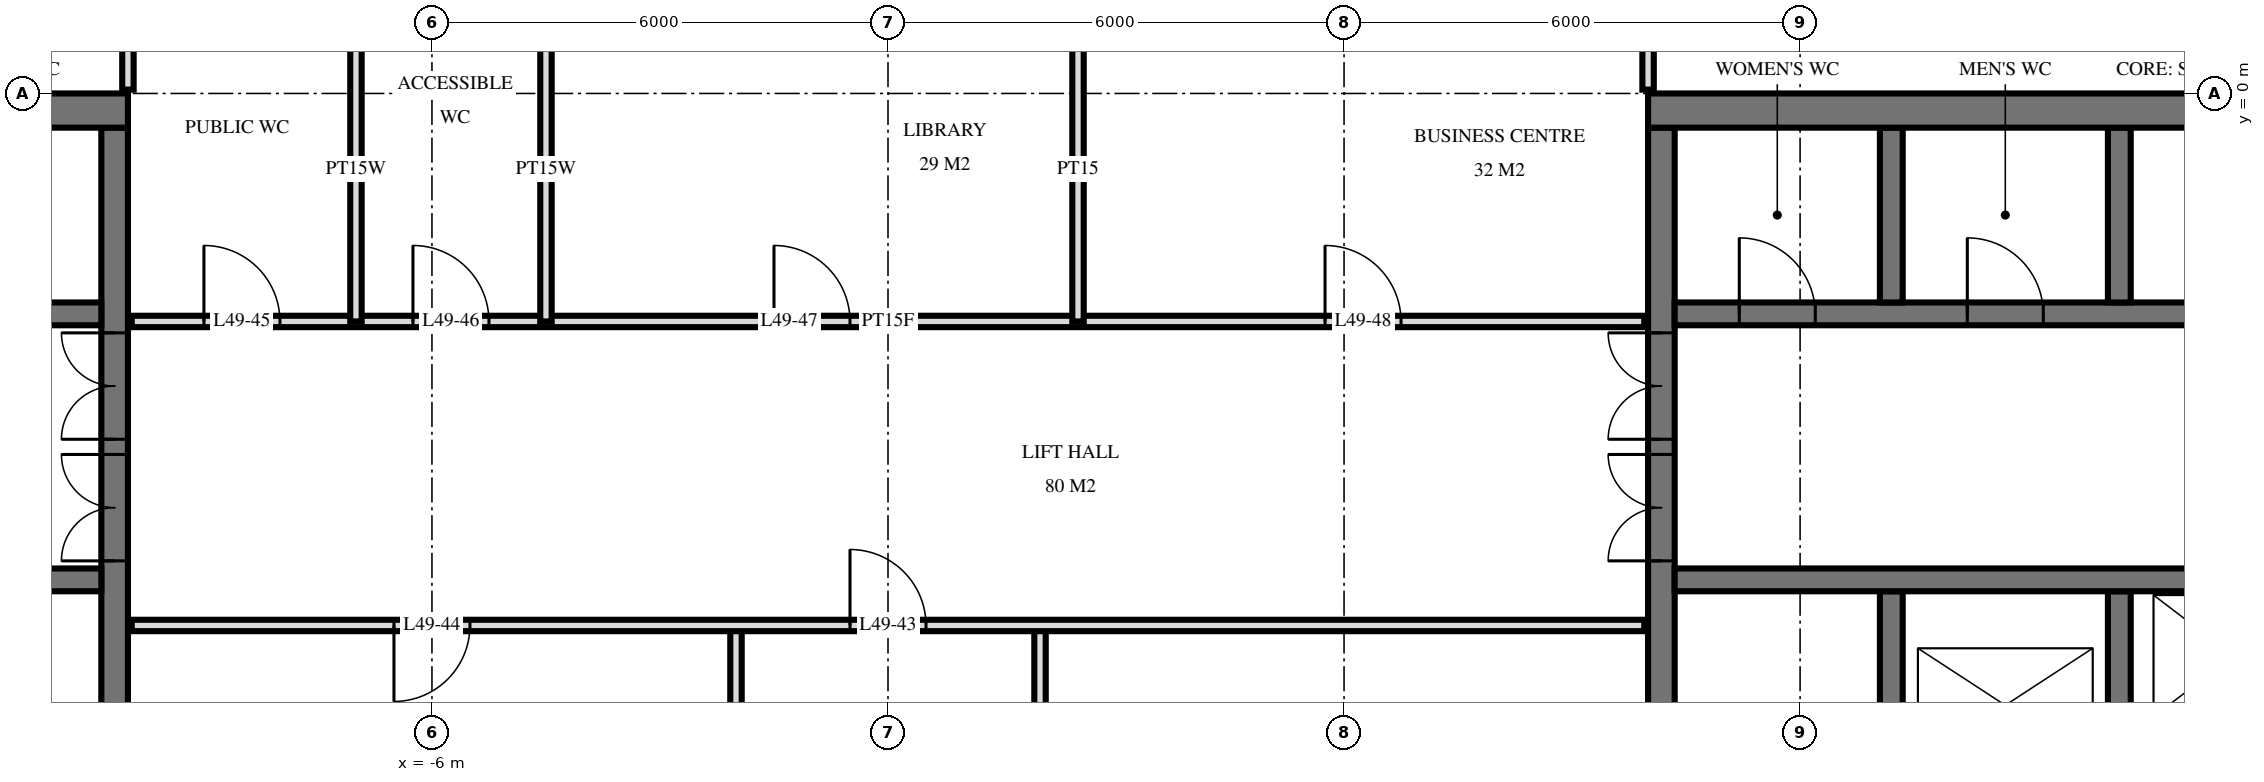
"""IFC4 building model, lengths in metres.
Left out: names, types, materials, properties, quantities, classifications, styles, units other than length and angle.
Written with IfcOpenShell. Run it as: python <this file> out.ifc"""

import sys

from ifc_helpers import new_model, si_unit, direction, frame, frame_2d, origin, place, context, subcontext, project, spatial, rectangle, extrude, element, fill, save


model = new_model("IFC4")
c1 = context("Model", 3, precision=1e-05, world=origin(), true_north=direction((0.0, 1.0)))
c2 = subcontext(c1, "Body", "Model", "MODEL_VIEW")
j1 = project(units=[si_unit("LENGTHUNIT", "METRE"), si_unit("PLANEANGLEUNIT", "RADIAN")], contexts=[c1])
p1 = place(None, origin())
s1 = spatial("IfcSite", under=j1, at=p1, CompositionType="ELEMENT")
p2 = place(p1, origin())
s2 = spatial("IfcBuilding", under=s1, at=p2, CompositionType="ELEMENT")
p3 = place(p2, frame((0.0, 0.0, 190.6)))
s3 = spatial("IfcBuildingStorey", under=s2, at=p3, CompositionType="ELEMENT", Elevation=190.6)
p4 = place(p3, frame((-24.5, -0.225, 0.0), z_axis=(0.0, 0.0, 1.0), x_axis=(1.0, 0.0, 0.0)))
e1 = element("IfcWall", 1, at=p4, inside=s3, PredefinedType="SHEAR", context=c2, shape_type="SweptSolid", body=[
    extrude(rectangle(XDim=14.5, YDim=0.45, at=frame_2d((7.25, 0.0))), origin(), (0.0, 0.0, 1.0), 3.5),
])
p5 = place(p3, frame((-10.175, -14.55, 0.0), z_axis=(0.0, 0.0, 1.0), x_axis=(0.0, 1.0, 0.0)))
e2 = element("IfcWall", 2, at=p5, inside=s3, PredefinedType="SHEAR", context=c2, shape_type="SweptSolid", body=[
    extrude(rectangle(XDim=14.1, YDim=0.35, at=frame_2d((7.05, 0.0))), origin(), (0.0, 0.0, 1.0), 3.5),
])
p6 = place(p5, frame((8.4, 0.0, 0.0)))
e3 = element("IfcOpeningElement", 3, at=p6, cuts=e2, PredefinedType="OPENING", context=c2, shape_type="SweptSolid", body=[
    extrude(rectangle(XDim=1.4, YDim=2.4, at=frame_2d((0.7, 1.2))), frame((0.0, 0.185, 0.0), z_axis=(0.0, -1.0, 0.0), x_axis=(1.0, 0.0, 0.0)), (0.0, 0.0, 1.0), 0.37),
])
p7 = place(p5, frame((10.0, 0.0, 0.0)))
e4 = element("IfcOpeningElement", 4, at=p7, cuts=e2, PredefinedType="OPENING", context=c2, shape_type="SweptSolid", body=[
    extrude(rectangle(XDim=1.4, YDim=2.4, at=frame_2d((0.7, 1.2))), frame((0.0, 0.185, 0.0), z_axis=(0.0, -1.0, 0.0), x_axis=(1.0, 0.0, 0.0)), (0.0, 0.0, 1.0), 0.37),
])
p8 = place(p5, frame((4.0, 0.0, 0.0)))
e5 = element("IfcOpeningElement", 5, at=p8, cuts=e2, PredefinedType="OPENING", context=c2, shape_type="SweptSolid", body=[
    extrude(rectangle(XDim=1.2, YDim=2.1, at=frame_2d((0.6, 1.05))), frame((0.0, 0.185, 0.0), z_axis=(0.0, -1.0, 0.0), x_axis=(1.0, 0.0, 0.0)), (0.0, 0.0, 1.0), 0.37),
])
p9 = place(p3, frame((-24.05, -2.9, 0.0), z_axis=(0.0, 0.0, 1.0), x_axis=(1.0, 0.0, 0.0)))
e6 = element("IfcWall", 6, at=p9, inside=s3, PredefinedType="SHEAR", context=c2, shape_type="SweptSolid", body=[
    extrude(rectangle(XDim=13.7, YDim=0.3, at=frame_2d((6.85, 0.0))), origin(), (0.0, 0.0, 1.0), 3.5),
])
p10 = place(p9, frame((0.55, 0.0, 0.0)))
e7 = element("IfcOpeningElement", 7, at=p10, cuts=e6, PredefinedType="OPENING", context=c2, shape_type="SweptSolid", body=[
    extrude(rectangle(XDim=1.1, YDim=2.1, at=frame_2d((0.55, 1.05))), frame((0.0, 0.16, 0.0), z_axis=(0.0, -1.0, 0.0), x_axis=(1.0, 0.0, 0.0)), (0.0, 0.0, 1.0), 0.32),
])
p11 = place(p9, frame((5.9, 0.0, 0.0)))
e8 = element("IfcOpeningElement", 8, at=p11, cuts=e6, PredefinedType="OPENING", context=c2, shape_type="SweptSolid", body=[
    extrude(rectangle(XDim=0.9, YDim=2.1, at=frame_2d((0.45, 1.05))), frame((0.0, 0.16, 0.0), z_axis=(0.0, -1.0, 0.0), x_axis=(1.0, 0.0, 0.0)), (0.0, 0.0, 1.0), 0.32),
])
p12 = place(p9, frame((11.85, 0.0, 0.0)))
e9 = element("IfcOpeningElement", 9, at=p12, cuts=e6, PredefinedType="OPENING", context=c2, shape_type="SweptSolid", body=[
    extrude(rectangle(XDim=1.0, YDim=2.1, at=frame_2d((0.5, 1.05))), frame((0.0, 0.16, 0.0), z_axis=(0.0, -1.0, 0.0), x_axis=(1.0, 0.0, 0.0)), (0.0, 0.0, 1.0), 0.32),
])
p13 = place(p9, frame((8.85, 0.0, 0.0)))
e10 = element("IfcOpeningElement", 10, at=p13, cuts=e6, PredefinedType="OPENING", context=c2, shape_type="SweptSolid", body=[
    extrude(rectangle(XDim=1.0, YDim=2.1, at=frame_2d((0.5, 1.05))), frame((0.0, 0.16, 0.0), z_axis=(0.0, -1.0, 0.0), x_axis=(1.0, 0.0, 0.0)), (0.0, 0.0, 1.0), 0.32),
])
p14 = place(p9, frame((3.0, 0.0, 0.0)))
e11 = element("IfcOpeningElement", 11, at=p14, cuts=e6, PredefinedType="OPENING", context=c2, shape_type="SweptSolid", body=[
    extrude(rectangle(XDim=1.0, YDim=2.1, at=frame_2d((0.5, 1.05))), frame((0.0, 0.16, 0.0), z_axis=(0.0, -1.0, 0.0), x_axis=(1.0, 0.0, 0.0)), (0.0, 0.0, 1.0), 0.32),
])
p15 = place(p3, frame((-24.05, -6.4, 0.0), z_axis=(0.0, 0.0, 1.0), x_axis=(1.0, 0.0, 0.0)))
e12 = element("IfcWall", 12, at=p15, inside=s3, PredefinedType="SHEAR", context=c2, shape_type="SweptSolid", body=[
    extrude(rectangle(XDim=13.7, YDim=0.3, at=frame_2d((6.85, 0.0))), origin(), (0.0, 0.0, 1.0), 3.5),
])
p16 = place(p15, frame((0.55, 0.0, 0.0)))
e13 = element("IfcOpeningElement", 13, at=p16, cuts=e12, PredefinedType="OPENING", context=c2, shape_type="SweptSolid", body=[
    extrude(rectangle(XDim=1.1, YDim=2.1, at=frame_2d((0.55, 1.05))), frame((0.0, 0.16, 0.0), z_axis=(0.0, -1.0, 0.0), x_axis=(1.0, 0.0, 0.0)), (0.0, 0.0, 1.0), 0.32),
])
p17 = place(p15, frame((5.8, 0.0, 0.0)))
e14 = element("IfcOpeningElement", 14, at=p17, cuts=e12, PredefinedType="OPENING", context=c2, shape_type="SweptSolid", body=[
    extrude(rectangle(XDim=1.1, YDim=2.1, at=frame_2d((0.55, 1.05))), frame((0.0, 0.16, 0.0), z_axis=(0.0, -1.0, 0.0), x_axis=(1.0, 0.0, 0.0)), (0.0, 0.0, 1.0), 0.32),
])
p18 = place(p3, frame((10.0, -0.225, 0.0), z_axis=(0.0, 0.0, 1.0), x_axis=(1.0, 0.0, 0.0)))
e15 = element("IfcWall", 15, at=p18, inside=s3, PredefinedType="SHEAR", context=c2, shape_type="SweptSolid", body=[
    extrude(rectangle(XDim=14.5, YDim=0.45, at=frame_2d((7.25, 0.0))), origin(), (0.0, 0.0, 1.0), 3.5),
])
p19 = place(p3, frame((10.175, -14.55, 0.0), z_axis=(0.0, 0.0, 1.0), x_axis=(0.0, 1.0, 0.0)))
e16 = element("IfcWall", 16, at=p19, inside=s3, PredefinedType="SHEAR", context=c2, shape_type="SweptSolid", body=[
    extrude(rectangle(XDim=14.1, YDim=0.35, at=frame_2d((7.05, 0.0))), origin(), (0.0, 0.0, 1.0), 3.5),
])
p20 = place(p19, frame((8.4, 0.0, 0.0)))
e17 = element("IfcOpeningElement", 17, at=p20, cuts=e16, PredefinedType="OPENING", context=c2, shape_type="SweptSolid", body=[
    extrude(rectangle(XDim=1.4, YDim=2.4, at=frame_2d((0.7, 1.2))), frame((0.0, 0.185, 0.0), z_axis=(0.0, -1.0, 0.0), x_axis=(1.0, 0.0, 0.0)), (0.0, 0.0, 1.0), 0.37),
])
p21 = place(p19, frame((10.0, 0.0, 0.0)))
e18 = element("IfcOpeningElement", 18, at=p21, cuts=e16, PredefinedType="OPENING", context=c2, shape_type="SweptSolid", body=[
    extrude(rectangle(XDim=1.4, YDim=2.4, at=frame_2d((0.7, 1.2))), frame((0.0, 0.185, 0.0), z_axis=(0.0, -1.0, 0.0), x_axis=(1.0, 0.0, 0.0)), (0.0, 0.0, 1.0), 0.37),
])
p22 = place(p19, frame((4.0, 0.0, 0.0)))
e19 = element("IfcOpeningElement", 19, at=p22, cuts=e16, PredefinedType="OPENING", context=c2, shape_type="SweptSolid", body=[
    extrude(rectangle(XDim=1.2, YDim=2.1, at=frame_2d((0.6, 1.05))), frame((0.0, 0.185, 0.0), z_axis=(0.0, -1.0, 0.0), x_axis=(1.0, 0.0, 0.0)), (0.0, 0.0, 1.0), 0.37),
])
p23 = place(p3, frame((10.35, -2.9, 0.0), z_axis=(0.0, 0.0, 1.0), x_axis=(1.0, 0.0, 0.0)))
e20 = element("IfcWall", 20, at=p23, inside=s3, PredefinedType="SHEAR", context=c2, shape_type="SweptSolid", body=[
    extrude(rectangle(XDim=13.7, YDim=0.3, at=frame_2d((6.85, 0.0))), origin(), (0.0, 0.0, 1.0), 3.5),
])
p24 = place(p23, frame((12.05, 0.0, 0.0)))
e21 = element("IfcOpeningElement", 21, at=p24, cuts=e20, PredefinedType="OPENING", context=c2, shape_type="SweptSolid", body=[
    extrude(rectangle(XDim=1.1, YDim=2.1, at=frame_2d((0.55, 1.05))), frame((0.0, 0.16, 0.0), z_axis=(0.0, -1.0, 0.0), x_axis=(1.0, 0.0, 0.0)), (0.0, 0.0, 1.0), 0.32),
])
p25 = place(p23, frame((6.9, 0.0, 0.0)))
e22 = element("IfcOpeningElement", 22, at=p25, cuts=e20, PredefinedType="OPENING", context=c2, shape_type="SweptSolid", body=[
    extrude(rectangle(XDim=0.9, YDim=2.1, at=frame_2d((0.45, 1.05))), frame((0.0, 0.16, 0.0), z_axis=(0.0, -1.0, 0.0), x_axis=(1.0, 0.0, 0.0)), (0.0, 0.0, 1.0), 0.32),
])
p26 = place(p23, frame((0.85, 0.0, 0.0)))
e23 = element("IfcOpeningElement", 23, at=p26, cuts=e20, PredefinedType="OPENING", context=c2, shape_type="SweptSolid", body=[
    extrude(rectangle(XDim=1.0, YDim=2.1, at=frame_2d((0.5, 1.05))), frame((0.0, 0.16, 0.0), z_axis=(0.0, -1.0, 0.0), x_axis=(1.0, 0.0, 0.0)), (0.0, 0.0, 1.0), 0.32),
])
p27 = place(p23, frame((3.85, 0.0, 0.0)))
e24 = element("IfcOpeningElement", 24, at=p27, cuts=e20, PredefinedType="OPENING", context=c2, shape_type="SweptSolid", body=[
    extrude(rectangle(XDim=1.0, YDim=2.1, at=frame_2d((0.5, 1.05))), frame((0.0, 0.16, 0.0), z_axis=(0.0, -1.0, 0.0), x_axis=(1.0, 0.0, 0.0)), (0.0, 0.0, 1.0), 0.32),
])
p28 = place(p23, frame((9.7, 0.0, 0.0)))
e25 = element("IfcOpeningElement", 25, at=p28, cuts=e20, PredefinedType="OPENING", context=c2, shape_type="SweptSolid", body=[
    extrude(rectangle(XDim=1.0, YDim=2.1, at=frame_2d((0.5, 1.05))), frame((0.0, 0.16, 0.0), z_axis=(0.0, -1.0, 0.0), x_axis=(1.0, 0.0, 0.0)), (0.0, 0.0, 1.0), 0.32),
])
p29 = place(p3, frame((10.35, -6.4, 0.0), z_axis=(0.0, 0.0, 1.0), x_axis=(1.0, 0.0, 0.0)))
e26 = element("IfcWall", 26, at=p29, inside=s3, PredefinedType="SHEAR", context=c2, shape_type="SweptSolid", body=[
    extrude(rectangle(XDim=13.7, YDim=0.3, at=frame_2d((6.85, 0.0))), origin(), (0.0, 0.0, 1.0), 3.5),
])
p30 = place(p29, frame((12.05, 0.0, 0.0)))
e27 = element("IfcOpeningElement", 27, at=p30, cuts=e26, PredefinedType="OPENING", context=c2, shape_type="SweptSolid", body=[
    extrude(rectangle(XDim=1.1, YDim=2.1, at=frame_2d((0.55, 1.05))), frame((0.0, 0.16, 0.0), z_axis=(0.0, -1.0, 0.0), x_axis=(1.0, 0.0, 0.0)), (0.0, 0.0, 1.0), 0.32),
])
p31 = place(p29, frame((6.8, 0.0, 0.0)))
e28 = element("IfcOpeningElement", 28, at=p31, cuts=e26, PredefinedType="OPENING", context=c2, shape_type="SweptSolid", body=[
    extrude(rectangle(XDim=1.1, YDim=2.1, at=frame_2d((0.55, 1.05))), frame((0.0, 0.16, 0.0), z_axis=(0.0, -1.0, 0.0), x_axis=(1.0, 0.0, 0.0)), (0.0, 0.0, 1.0), 0.32),
])
for number, where, z_axis, x_axis in (
    (29, (13.2, -2.75, 0.0), (0.0, 0.0, 1.0), (0.0, 1.0, 0.0)),
    (30, (13.2, -8.85, 0.0), (0.0, 0.0, 1.0), (0.0, 1.0, 0.0)),
    (31, (16.2, -2.75, 0.0), (0.0, 0.0, 1.0), (0.0, 1.0, 0.0)),
    (32, (16.2, -8.85, 0.0), (0.0, 0.0, 1.0), (0.0, 1.0, 0.0)),
):
    element("IfcWall", number, at=place(p3, frame(where, z_axis=z_axis, x_axis=x_axis)), inside=s3, PredefinedType="SHEAR", context=c2, shape_type="SweptSolid", body=[
        extrude(rectangle(XDim=2.3, YDim=0.3, at=frame_2d((1.15, 0.0))), origin(), (0.0, 0.0, 1.0), 3.5),
    ])
p32 = place(p3, frame((10.0, 0.05, 0.0), z_axis=(0.0, 0.0, 1.0), x_axis=(0.0, 1.0, 0.0)))
e33 = element("IfcWall", 33, at=p32, inside=s3, PredefinedType="PARTITIONING", context=c2, shape_type="SweptSolid", body=[
    extrude(rectangle(XDim=0.97, YDim=0.15, at=frame_2d((0.485, 0.0))), origin(), (0.0, 0.0, 1.0), 3.22),
])
p33 = place(p3, frame((2.5, -3.0, 0.0), z_axis=(0.0, 0.0, 1.0), x_axis=(0.0, 1.0, 0.0)))
e34 = element("IfcWall", 34, at=p33, inside=s3, PredefinedType="PARTITIONING", context=c2, shape_type="SweptSolid", body=[
    extrude(rectangle(XDim=4.02, YDim=0.15, at=frame_2d((2.01, 0.0))), origin(), (0.0, 0.0, 1.0), 3.22),
])
for number, where, z_axis, x_axis in (
    (35, (2.0, -11.0, 0.0), (0.0, 0.0, 1.0), (0.0, 1.0, 0.0)),
    (36, (-2.0, -11.0, 0.0), (0.0, 0.0, 1.0), (0.0, 1.0, 0.0)),
):
    element("IfcWall", number, at=place(p3, frame(where, z_axis=z_axis, x_axis=x_axis)), inside=s3, PredefinedType="PARTITIONING", context=c2, shape_type="SweptSolid", body=[
        extrude(rectangle(XDim=4.0, YDim=0.15, at=frame_2d((2.0, 0.0))), origin(), (0.0, 0.0, 1.0), 3.22),
    ])
for number, where, z_axis, x_axis in (
    (37, (-4.5, -3.0, 0.0), (0.0, 0.0, 1.0), (0.0, 1.0, 0.0)),
    (38, (-7.0, -3.0, 0.0), (0.0, 0.0, 1.0), (0.0, 1.0, 0.0)),
):
    element("IfcWall", number, at=place(p3, frame(where, z_axis=z_axis, x_axis=x_axis)), inside=s3, PredefinedType="PLUMBINGWALL", context=c2, shape_type="SweptSolid", body=[
        extrude(rectangle(XDim=4.02, YDim=0.15, at=frame_2d((2.01, 0.0))), origin(), (0.0, 0.0, 1.0), 3.22),
    ])
p34 = place(p3, frame((-10.0, 0.05, 0.0), z_axis=(0.0, 0.0, 1.0), x_axis=(0.0, 1.0, 0.0)))
e39 = element("IfcWall", 39, at=p34, inside=s3, PredefinedType="PLUMBINGWALL", context=c2, shape_type="SweptSolid", body=[
    extrude(rectangle(XDim=0.97, YDim=0.15, at=frame_2d((0.485, 0.0))), origin(), (0.0, 0.0, 1.0), 3.22),
])
p35 = place(p3, frame((-9.95, -7.0, 0.0), z_axis=(0.0, 0.0, 1.0), x_axis=(1.0, 0.0, 0.0)))
e40 = element("IfcWall", 40, at=p35, inside=s3, PredefinedType="PARTITIONING", context=c2, shape_type="SweptSolid", body=[
    extrude(rectangle(XDim=19.9, YDim=0.15, at=frame_2d((9.95, 0.0))), origin(), (0.0, 0.0, 1.0), 3.22),
])
p36 = place(p35, frame((9.45, 0.0, 0.0)))
e41 = element("IfcOpeningElement", 41, at=p36, cuts=e40, PredefinedType="OPENING", context=c2, shape_type="SweptSolid", body=[
    extrude(rectangle(XDim=1.0, YDim=2.1, at=frame_2d((0.5, 1.05))), frame((0.0, 0.085, 0.0), z_axis=(0.0, -1.0, 0.0), x_axis=(1.0, 0.0, 0.0)), (0.0, 0.0, 1.0), 0.17),
])
p37 = place(p35, frame((3.45, 0.0, 0.0)))
e42 = element("IfcOpeningElement", 42, at=p37, cuts=e40, PredefinedType="OPENING", context=c2, shape_type="SweptSolid", body=[
    extrude(rectangle(XDim=1.0, YDim=2.1, at=frame_2d((0.5, 1.05))), frame((0.0, 0.085, 0.0), z_axis=(0.0, -1.0, 0.0), x_axis=(1.0, 0.0, 0.0)), (0.0, 0.0, 1.0), 0.17),
])
p38 = place(p3, frame((-9.95, -3.0, 0.0), z_axis=(0.0, 0.0, 1.0), x_axis=(1.0, 0.0, 0.0)))
e43 = element("IfcWall", 43, at=p38, inside=s3, PredefinedType="PARTITIONING", context=c2, shape_type="SweptSolid", body=[
    extrude(rectangle(XDim=19.9, YDim=0.15, at=frame_2d((9.95, 0.0))), origin(), (0.0, 0.0, 1.0), 3.22),
])
p39 = place(p38, frame((0.95, 0.0, 0.0)))
e44 = element("IfcOpeningElement", 44, at=p39, cuts=e43, PredefinedType="OPENING", context=c2, shape_type="SweptSolid", body=[
    extrude(rectangle(XDim=1.0, YDim=2.1, at=frame_2d((0.5, 1.05))), frame((0.0, 0.085, 0.0), z_axis=(0.0, -1.0, 0.0), x_axis=(1.0, 0.0, 0.0)), (0.0, 0.0, 1.0), 0.17),
])
p40 = place(p38, frame((3.7, 0.0, 0.0)))
e45 = element("IfcOpeningElement", 45, at=p40, cuts=e43, PredefinedType="OPENING", context=c2, shape_type="SweptSolid", body=[
    extrude(rectangle(XDim=1.0, YDim=2.1, at=frame_2d((0.5, 1.05))), frame((0.0, 0.085, 0.0), z_axis=(0.0, -1.0, 0.0), x_axis=(1.0, 0.0, 0.0)), (0.0, 0.0, 1.0), 0.17),
])
p41 = place(p38, frame((8.45, 0.0, 0.0)))
e46 = element("IfcOpeningElement", 46, at=p41, cuts=e43, PredefinedType="OPENING", context=c2, shape_type="SweptSolid", body=[
    extrude(rectangle(XDim=1.0, YDim=2.1, at=frame_2d((0.5, 1.05))), frame((0.0, 0.085, 0.0), z_axis=(0.0, -1.0, 0.0), x_axis=(1.0, 0.0, 0.0)), (0.0, 0.0, 1.0), 0.17),
])
p42 = place(p38, frame((15.7, 0.0, 0.0)))
e47 = element("IfcOpeningElement", 47, at=p42, cuts=e43, PredefinedType="OPENING", context=c2, shape_type="SweptSolid", body=[
    extrude(rectangle(XDim=1.0, YDim=2.1, at=frame_2d((0.5, 1.05))), frame((0.0, 0.085, 0.0), z_axis=(0.0, -1.0, 0.0), x_axis=(1.0, 0.0, 0.0)), (0.0, 0.0, 1.0), 0.17),
])
p43 = place(p6, origin())
e48 = element("IfcDoor", 48, at=p43, inside=s3, OperationType="DOUBLE_DOOR_SINGLE_SWING", PredefinedType="DOOR", context=c2, shape_type="SweptSolid", body=[
    extrude(rectangle(XDim=1.4, YDim=2.4, at=frame_2d((0.7, 1.2))), frame((0.0, 0.025, 0.0), z_axis=(0.0, -1.0, 0.0), x_axis=(1.0, 0.0, 0.0)), (0.0, 0.0, 1.0), 0.05),
])
fill(e3, e48)
p44 = place(p7, origin())
e49 = element("IfcDoor", 49, at=p44, inside=s3, OperationType="DOUBLE_DOOR_SINGLE_SWING", PredefinedType="DOOR", context=c2, shape_type="SweptSolid", body=[
    extrude(rectangle(XDim=1.4, YDim=2.4, at=frame_2d((0.7, 1.2))), frame((0.0, 0.025, 0.0), z_axis=(0.0, -1.0, 0.0), x_axis=(1.0, 0.0, 0.0)), (0.0, 0.0, 1.0), 0.05),
])
fill(e4, e49)
p45 = place(p20, origin())
e50 = element("IfcDoor", 50, at=p45, inside=s3, OperationType="DOUBLE_DOOR_SINGLE_SWING", PredefinedType="DOOR", context=c2, shape_type="SweptSolid", body=[
    extrude(rectangle(XDim=1.4, YDim=2.4, at=frame_2d((0.7, 1.2))), frame((0.0, 0.025, 0.0), z_axis=(0.0, -1.0, 0.0), x_axis=(1.0, 0.0, 0.0)), (0.0, 0.0, 1.0), 0.05),
])
fill(e17, e50)
p46 = place(p21, origin())
e51 = element("IfcDoor", 51, at=p46, inside=s3, OperationType="DOUBLE_DOOR_SINGLE_SWING", PredefinedType="DOOR", context=c2, shape_type="SweptSolid", body=[
    extrude(rectangle(XDim=1.4, YDim=2.4, at=frame_2d((0.7, 1.2))), frame((0.0, 0.025, 0.0), z_axis=(0.0, -1.0, 0.0), x_axis=(1.0, 0.0, 0.0)), (0.0, 0.0, 1.0), 0.05),
])
fill(e18, e51)
p47 = place(p26, origin())
e52 = element("IfcDoor", 52, at=p47, inside=s3, OperationType="SINGLE_SWING_RIGHT", PredefinedType="DOOR", context=c2, shape_type="SweptSolid", body=[
    extrude(rectangle(XDim=1.0, YDim=2.1, at=frame_2d((0.5, 1.05))), frame((0.0, 0.025, 0.0), z_axis=(0.0, -1.0, 0.0), x_axis=(1.0, 0.0, 0.0)), (0.0, 0.0, 1.0), 0.05),
])
fill(e23, e52)
p48 = place(p27, origin())
e53 = element("IfcDoor", 53, at=p48, inside=s3, OperationType="SINGLE_SWING_RIGHT", PredefinedType="DOOR", context=c2, shape_type="SweptSolid", body=[
    extrude(rectangle(XDim=1.0, YDim=2.1, at=frame_2d((0.5, 1.05))), frame((0.0, 0.025, 0.0), z_axis=(0.0, -1.0, 0.0), x_axis=(1.0, 0.0, 0.0)), (0.0, 0.0, 1.0), 0.05),
])
fill(e24, e53)
p49 = place(p36, origin())
e54 = element("IfcDoor", 54, at=p49, inside=s3, OperationType="SINGLE_SWING_RIGHT", PredefinedType="DOOR", context=c2, shape_type="SweptSolid", body=[
    extrude(rectangle(XDim=1.0, YDim=2.1, at=frame_2d((0.5, 1.05))), frame((0.0, 0.025, 0.0), z_axis=(0.0, -1.0, 0.0), x_axis=(1.0, 0.0, 0.0)), (0.0, 0.0, 1.0), 0.05),
])
fill(e41, e54)
p50 = place(p37, frame((0.5, 0.0, 0.0), z_axis=(0.0, 0.0, 1.0), x_axis=(-1.0, 0.0, 0.0)))
e55 = element("IfcDoor", 55, at=p50, inside=s3, OperationType="SINGLE_SWING_LEFT", PredefinedType="DOOR", context=c2, shape_type="SweptSolid", body=[
    extrude(rectangle(XDim=1.0, YDim=2.1, at=frame_2d((0.0, 1.05))), frame((0.0, -0.025, 0.0), z_axis=(0.0, 1.0, 0.0), x_axis=(-1.0, 0.0, 0.0)), (0.0, 0.0, 1.0), 0.05),
])
fill(e42, e55)
p51 = place(p39, origin())
e56 = element("IfcDoor", 56, at=p51, inside=s3, OperationType="SINGLE_SWING_RIGHT", PredefinedType="DOOR", context=c2, shape_type="SweptSolid", body=[
    extrude(rectangle(XDim=1.0, YDim=2.1, at=frame_2d((0.5, 1.05))), frame((0.0, 0.025, 0.0), z_axis=(0.0, -1.0, 0.0), x_axis=(1.0, 0.0, 0.0)), (0.0, 0.0, 1.0), 0.05),
])
fill(e44, e56)
p52 = place(p40, origin())
e57 = element("IfcDoor", 57, at=p52, inside=s3, OperationType="SINGLE_SWING_RIGHT", PredefinedType="DOOR", context=c2, shape_type="SweptSolid", body=[
    extrude(rectangle(XDim=1.0, YDim=2.1, at=frame_2d((0.5, 1.05))), frame((0.0, 0.025, 0.0), z_axis=(0.0, -1.0, 0.0), x_axis=(1.0, 0.0, 0.0)), (0.0, 0.0, 1.0), 0.05),
])
fill(e45, e57)
p53 = place(p41, origin())
e58 = element("IfcDoor", 58, at=p53, inside=s3, OperationType="SINGLE_SWING_RIGHT", PredefinedType="DOOR", context=c2, shape_type="SweptSolid", body=[
    extrude(rectangle(XDim=1.0, YDim=2.1, at=frame_2d((0.5, 1.05))), frame((0.0, 0.025, 0.0), z_axis=(0.0, -1.0, 0.0), x_axis=(1.0, 0.0, 0.0)), (0.0, 0.0, 1.0), 0.05),
])
fill(e46, e58)
p54 = place(p42, origin())
e59 = element("IfcDoor", 59, at=p54, inside=s3, OperationType="SINGLE_SWING_RIGHT", PredefinedType="DOOR", context=c2, shape_type="SweptSolid", body=[
    extrude(rectangle(XDim=1.0, YDim=2.1, at=frame_2d((0.5, 1.05))), frame((0.0, 0.025, 0.0), z_axis=(0.0, -1.0, 0.0), x_axis=(1.0, 0.0, 0.0)), (0.0, 0.0, 1.0), 0.05),
])
fill(e47, e59)
save(model, sys.argv[1])
